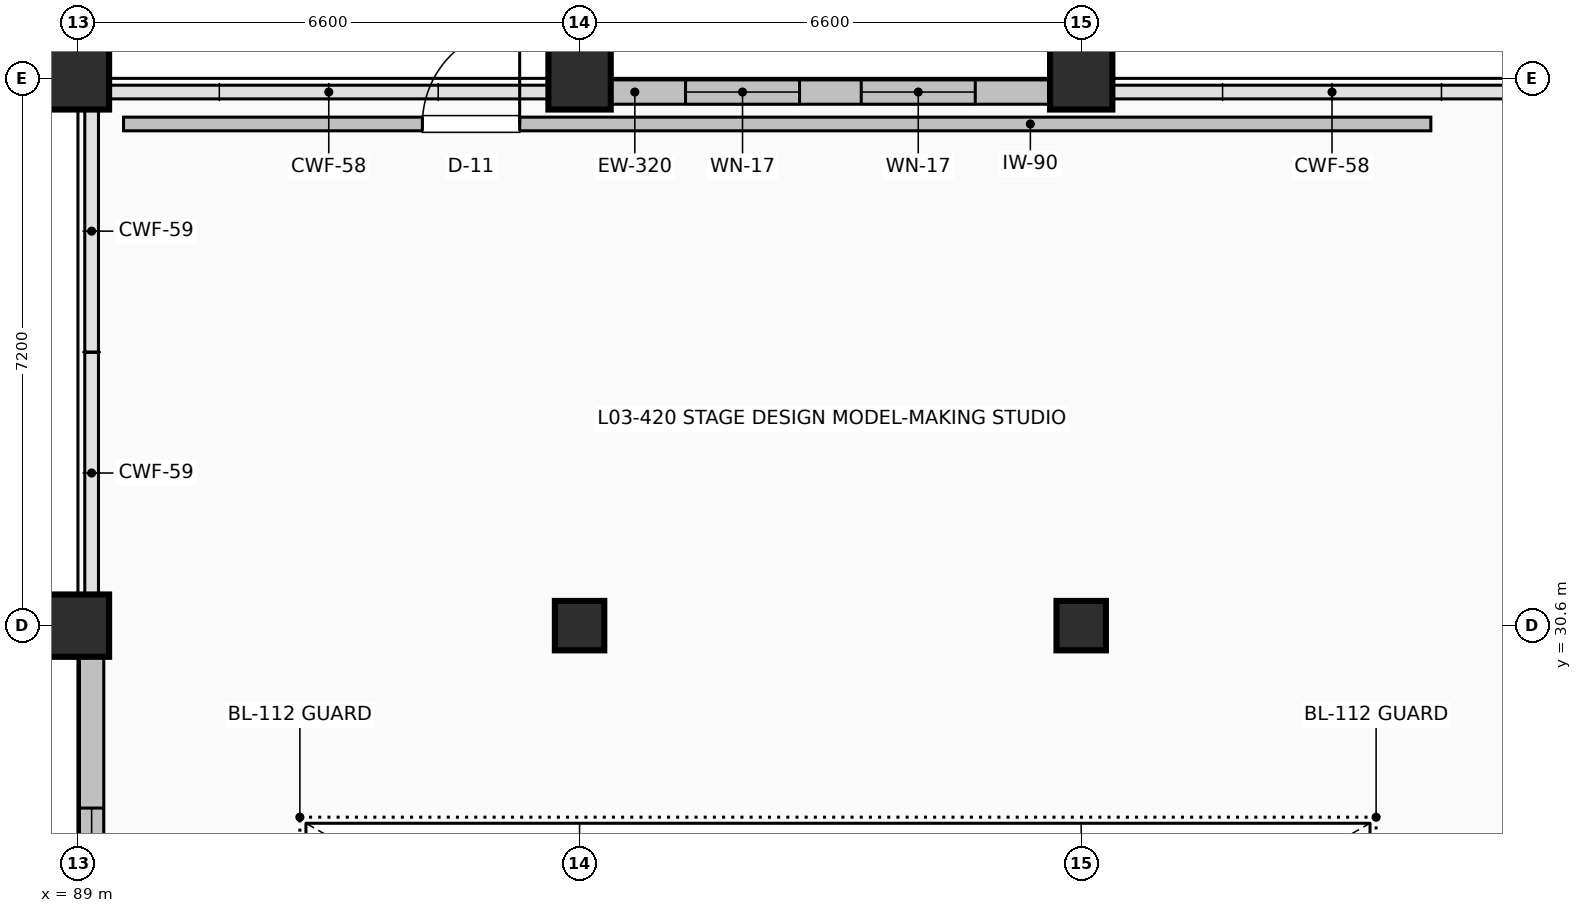
"""IFC4 building model, lengths in metres.
Left out: names, types, materials, properties, quantities, classifications, styles, units other than length and angle.
Written with IfcOpenShell. Run it as: python <this file> out.ifc"""

import sys

from ifc_helpers import new_model, si_unit, direction, frame, frame_2d, origin, origin_2d, place, context, subcontext, project, spatial, rectangle, extrude, element, fill, save


model = new_model("IFC4")
c1 = context("Model", 3, precision=1e-05, world=origin(), true_north=direction((0.0, 1.0)))
c2 = subcontext(c1, "Body", "Model", "MODEL_VIEW")
j1 = project(units=[si_unit("LENGTHUNIT", "METRE"), si_unit("PLANEANGLEUNIT", "RADIAN")], contexts=[c1])
p1 = place(None, origin())
s1 = spatial("IfcSite", under=j1, at=p1, CompositionType="ELEMENT")
p2 = place(p1, origin())
s2 = spatial("IfcBuilding", under=s1, at=p2, CompositionType="ELEMENT")
p3 = place(p2, frame((0.0, 0.0, 15.0)))
s3 = spatial("IfcBuildingStorey", under=s2, at=p3, CompositionType="ELEMENT", Elevation=15.0)
for number, where, z_axis, x_axis in (
    (1, (89.0, 30.6, 0.0), (0.0, 0.0, 1.0), (1.0, 0.0, 0.0)),
    (2, (89.0, 37.8, 0.0), (0.0, 0.0, 1.0), (1.0, 0.0, 0.0)),
):
    element("IfcColumn", number, at=place(p3, frame(where, z_axis=z_axis, x_axis=x_axis)), inside=s3, PredefinedType="COLUMN", context=c2, shape_type="SweptSolid", body=[
        extrude(rectangle(XDim=0.82, YDim=0.82, at=origin_2d()), origin(), (0.0, 0.0, 1.0), 4.5),
    ])
p4 = place(p3, frame((95.6, 30.6, 0.0), z_axis=(0.0, 0.0, 1.0), x_axis=(1.0, 0.0, 0.0)))
e3 = element("IfcColumn", 3, at=p4, inside=s3, PredefinedType="COLUMN", context=c2, shape_type="SweptSolid", body=[
    extrude(rectangle(XDim=0.65, YDim=0.65, at=origin_2d()), origin(), (0.0, 0.0, 1.0), 4.5),
])
p5 = place(p3, frame((95.6, 37.8, 0.0), z_axis=(0.0, 0.0, 1.0), x_axis=(1.0, 0.0, 0.0)))
e4 = element("IfcColumn", 4, at=p5, inside=s3, PredefinedType="COLUMN", context=c2, shape_type="SweptSolid", body=[
    extrude(rectangle(XDim=0.82, YDim=0.82, at=origin_2d()), origin(), (0.0, 0.0, 1.0), 4.5),
])
p6 = place(p3, frame((102.2, 30.6, 0.0), z_axis=(0.0, 0.0, 1.0), x_axis=(1.0, 0.0, 0.0)))
e5 = element("IfcColumn", 5, at=p6, inside=s3, PredefinedType="COLUMN", context=c2, shape_type="SweptSolid", body=[
    extrude(rectangle(XDim=0.65, YDim=0.65, at=origin_2d()), origin(), (0.0, 0.0, 1.0), 4.5),
])
p7 = place(p3, frame((102.2, 37.8, 0.0), z_axis=(0.0, 0.0, 1.0), x_axis=(1.0, 0.0, 0.0)))
e6 = element("IfcColumn", 6, at=p7, inside=s3, PredefinedType="COLUMN", context=c2, shape_type="SweptSolid", body=[
    extrude(rectangle(XDim=0.82, YDim=0.82, at=origin_2d()), origin(), (0.0, 0.0, 1.0), 4.5),
])
p8 = place(p3, frame((96.01, 37.62, 0.0), z_axis=(0.0, 0.0, 1.0), x_axis=(1.0, 0.0, 0.0)))
e7 = element("IfcWall", 7, at=p8, inside=s3, PredefinedType="SOLIDWALL", context=c2, shape_type="SweptSolid", body=[
    extrude(rectangle(XDim=5.78, YDim=0.32, at=frame_2d((2.89, 0.0))), origin(), (0.0, 0.0, 1.0), 3.522),
])
p9 = place(p8, frame((0.984, 0.0, 1.0)))
e8 = element("IfcOpeningElement", 8, at=p9, cuts=e7, PredefinedType="OPENING", context=c2, shape_type="SweptSolid", body=[
    extrude(rectangle(XDim=1.5, YDim=1.7, at=frame_2d((0.75, 0.85))), frame((0.0, 0.17, 0.0), z_axis=(0.0, -1.0, 0.0), x_axis=(1.0, 0.0, 0.0)), (0.0, 0.0, 1.0), 0.34),
])
p10 = place(p8, frame((3.296, 0.0, 1.0)))
e9 = element("IfcOpeningElement", 9, at=p10, cuts=e7, PredefinedType="OPENING", context=c2, shape_type="SweptSolid", body=[
    extrude(rectangle(XDim=1.5, YDim=1.7, at=frame_2d((0.75, 0.85))), frame((0.0, 0.17, 0.0), z_axis=(0.0, -1.0, 0.0), x_axis=(1.0, 0.0, 0.0)), (0.0, 0.0, 1.0), 0.34),
])
p11 = place(p3, frame((89.18, 23.81, 0.0), z_axis=(0.0, 0.0, 1.0), x_axis=(0.0, 1.0, 0.0)))
e10 = element("IfcWall", 10, at=p11, inside=s3, PredefinedType="SOLIDWALL", context=c2, shape_type="SweptSolid", body=[
    extrude(rectangle(XDim=6.38, YDim=0.32, at=frame_2d((3.19, 0.0))), origin(), (0.0, 0.0, 1.0), 3.522),
])
p12 = place(p11, frame((1.99, 0.0, 1.0)))
e11 = element("IfcOpeningElement", 11, at=p12, cuts=e10, PredefinedType="OPENING", context=c2, shape_type="SweptSolid", body=[
    extrude(rectangle(XDim=2.4, YDim=1.7, at=frame_2d((1.2, 0.85))), frame((0.0, 0.17, 0.0), z_axis=(0.0, -1.0, 0.0), x_axis=(1.0, 0.0, 0.0)), (0.0, 0.0, 1.0), 0.34),
])
p13 = place(p3, frame((89.6, 37.2, 0.0), z_axis=(0.0, 0.0, 1.0), x_axis=(1.0, 0.0, 0.0)))
e12 = element("IfcWall", 12, at=p13, inside=s3, PredefinedType="PARTITIONING", context=c2, shape_type="SweptSolid", body=[
    extrude(rectangle(XDim=17.2, YDim=0.18, at=frame_2d((8.6, 0.0))), origin(), (0.0, 0.0, 1.0), 4.192),
])
p14 = place(p13, frame((3.932, 0.0, 0.0)))
e13 = element("IfcOpeningElement", 13, at=p14, cuts=e12, PredefinedType="OPENING", context=c2, shape_type="SweptSolid", body=[
    extrude(rectangle(XDim=1.28, YDim=2.14, at=frame_2d((0.64, 1.07))), frame((0.0, 0.1, 0.0), z_axis=(0.0, -1.0, 0.0), x_axis=(1.0, 0.0, 0.0)), (0.0, 0.0, 1.0), 0.2),
])
p15 = place(p9, origin())
e14 = element("IfcWindow", 14, at=p15, inside=s3, PartitioningType="SINGLE_PANEL", PredefinedType="WINDOW", context=c2, shape_type="SweptSolid", body=[
    extrude(rectangle(XDim=1.5, YDim=1.7, at=frame_2d((0.75, 0.85))), frame((0.0, 0.03, 0.0), z_axis=(0.0, -1.0, 0.0), x_axis=(1.0, 0.0, 0.0)), (0.0, 0.0, 1.0), 0.06),
])
fill(e8, e14)
p16 = place(p10, origin())
e15 = element("IfcWindow", 15, at=p16, inside=s3, PartitioningType="SINGLE_PANEL", PredefinedType="WINDOW", context=c2, shape_type="SweptSolid", body=[
    extrude(rectangle(XDim=1.5, YDim=1.7, at=frame_2d((0.75, 0.85))), frame((0.0, 0.03, 0.0), z_axis=(0.0, -1.0, 0.0), x_axis=(1.0, 0.0, 0.0)), (0.0, 0.0, 1.0), 0.06),
])
fill(e9, e15)
p17 = place(p12, origin())
e16 = element("IfcWindow", 16, at=p17, inside=s3, PartitioningType="SINGLE_PANEL", PredefinedType="WINDOW", context=c2, shape_type="SweptSolid", body=[
    extrude(rectangle(XDim=2.4, YDim=1.7, at=frame_2d((1.2, 0.85))), frame((0.0, 0.03, 0.0), z_axis=(0.0, -1.0, 0.0), x_axis=(1.0, 0.0, 0.0)), (0.0, 0.0, 1.0), 0.06),
])
fill(e11, e16)
p18 = place(p14, origin())
e17 = element("IfcDoor", 17, at=p18, inside=s3, OperationType="SINGLE_SWING_RIGHT", PredefinedType="DOOR", context=c2, shape_type="SweptSolid", body=[
    extrude(rectangle(XDim=1.28, YDim=2.14, at=frame_2d((0.64, 1.07))), frame((0.0, 0.025, 0.0), z_axis=(0.0, -1.0, 0.0), x_axis=(1.0, 0.0, 0.0)), (0.0, 0.0, 1.0), 0.05),
])
fill(e13, e17)
save(model, sys.argv[1])
